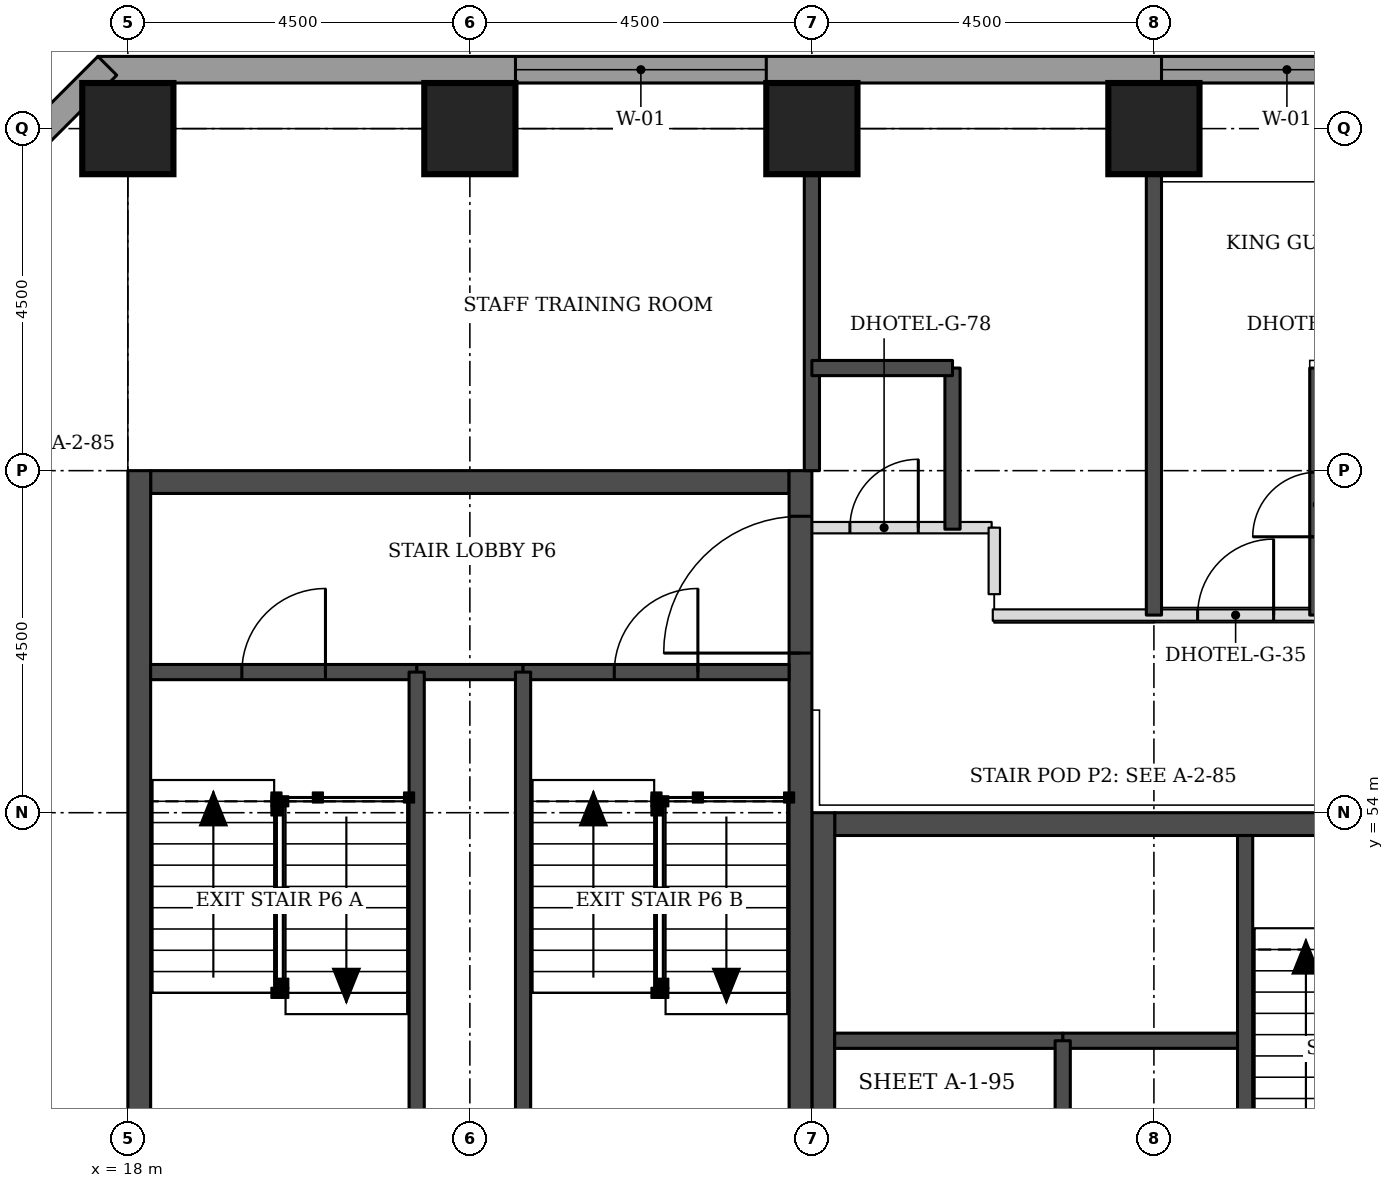
"""IFC4 building model, lengths in metres.
Left out: names, types, materials, properties, quantities, classifications, styles, units other than length and angle.
Written with IfcOpenShell. Run it as: python <this file> out.ifc"""

import sys

from ifc_helpers import new_model, si_unit, direction, frame, frame_2d, origin, origin_2d, place, context, subcontext, project, spatial, rectangle, extrude, element, fill, save


model = new_model("IFC4")
c1 = context("Model", 3, precision=1e-05, world=origin(), true_north=direction((0.0, 1.0)))
c2 = subcontext(c1, "Body", "Model", "MODEL_VIEW")
j1 = project(units=[si_unit("LENGTHUNIT", "METRE"), si_unit("PLANEANGLEUNIT", "RADIAN")], contexts=[c1])
p1 = place(None, origin())
s1 = spatial("IfcSite", under=j1, at=p1, CompositionType="ELEMENT")
p2 = place(p1, origin())
s2 = spatial("IfcBuilding", under=s1, at=p2, CompositionType="ELEMENT")
p3 = place(p2, frame((0.0, 0.0, 66.0)))
s3 = spatial("IfcBuildingStorey", under=s2, at=p3, CompositionType="ELEMENT", Elevation=66.0)
for number, where, z_axis, x_axis in (
    (1, (18.0, 63.0, 0.0), (0.0, 0.0, 1.0), (1.0, 0.0, 0.0)),
    (2, (22.5, 63.0, 0.0), (0.0, 0.0, 1.0), (1.0, 0.0, 0.0)),
    (3, (27.0, 63.0, 0.0), (0.0, 0.0, 1.0), (1.0, 0.0, 0.0)),
    (4, (31.5, 63.0, 0.0), (0.0, 0.0, 1.0), (1.0, 0.0, 0.0)),
):
    element("IfcColumn", number, at=place(p3, frame(where, z_axis=z_axis, x_axis=x_axis)), inside=s3, PredefinedType="COLUMN", context=c2, shape_type="SweptSolid", body=[
        extrude(rectangle(XDim=1.2, YDim=1.2, at=origin_2d()), origin(), (0.0, 0.0, 1.0), 3.3),
    ])
p4 = place(p3, frame((27.3, 53.85, 0.0), z_axis=(0.0, 0.0, 1.0), x_axis=(1.0, 0.0, 0.0)))
e5 = element("IfcWall", 5, at=p4, inside=s3, PredefinedType="SHEAR", context=c2, shape_type="SweptSolid", body=[
    extrude(rectangle(XDim=8.4, YDim=0.3, at=frame_2d((4.2, 0.0))), origin(), (0.0, 0.0, 1.0), 3.3),
])
p5 = place(p4, frame((6.4, 0.0, 0.0)))
e6 = element("IfcOpeningElement", 6, at=p5, cuts=e5, PredefinedType="OPENING", context=c2, shape_type="SweptSolid", body=[
    extrude(rectangle(XDim=1.1, YDim=2.1, at=frame_2d((0.55, 1.05))), frame((0.0, 0.16, 0.0), z_axis=(0.0, -1.0, 0.0), x_axis=(1.0, 0.0, 0.0)), (0.0, 0.0, 1.0), 0.32),
])
p6 = place(p3, frame((27.15, 45.0, 0.0), z_axis=(0.0, 0.0, 1.0), x_axis=(0.0, 1.0, 0.0)))
e7 = element("IfcWall", 7, at=p6, inside=s3, PredefinedType="SHEAR", context=c2, shape_type="SweptSolid", body=[
    extrude(rectangle(XDim=9.0, YDim=0.3, at=frame_2d((4.5, 0.0))), origin(), (0.0, 0.0, 1.0), 3.3),
])
p7 = place(p6, frame((0.4, 0.0, 0.0)))
e8 = element("IfcOpeningElement", 8, at=p7, cuts=e7, PredefinedType="OPENING", context=c2, shape_type="SweptSolid", body=[
    extrude(rectangle(XDim=1.1, YDim=2.1, at=frame_2d((0.55, 1.05))), frame((0.0, 0.16, 0.0), z_axis=(0.0, -1.0, 0.0), x_axis=(1.0, 0.0, 0.0)), (0.0, 0.0, 1.0), 0.32),
])
p8 = place(p3, frame((18.3, 58.35, 0.0), z_axis=(0.0, 0.0, 1.0), x_axis=(1.0, 0.0, 0.0)))
e9 = element("IfcWall", 9, at=p8, inside=s3, PredefinedType="SHEAR", context=c2, shape_type="SweptSolid", body=[
    extrude(rectangle(XDim=8.4, YDim=0.3, at=frame_2d((4.2, 0.0))), origin(), (0.0, 0.0, 1.0), 3.3),
])
p9 = place(p3, frame((18.15, 49.5, 0.0), z_axis=(0.0, 0.0, 1.0), x_axis=(0.0, 1.0, 0.0)))
e10 = element("IfcWall", 10, at=p9, inside=s3, PredefinedType="SHEAR", context=c2, shape_type="SweptSolid", body=[
    extrude(rectangle(XDim=9.0, YDim=0.3, at=frame_2d((4.5, 0.0))), origin(), (0.0, 0.0, 1.0), 3.3),
])
p10 = place(p3, frame((26.85, 49.5, 0.0), z_axis=(0.0, 0.0, 1.0), x_axis=(0.0, 1.0, 0.0)))
e11 = element("IfcWall", 11, at=p10, inside=s3, PredefinedType="SHEAR", context=c2, shape_type="SweptSolid", body=[
    extrude(rectangle(XDim=9.0, YDim=0.3, at=frame_2d((4.5, 0.0))), origin(), (0.0, 0.0, 1.0), 3.3),
])
p11 = place(p10, frame((6.6, 0.0, 0.0)))
e12 = element("IfcOpeningElement", 12, at=p11, cuts=e11, PredefinedType="OPENING", context=c2, shape_type="SweptSolid", body=[
    extrude(rectangle(XDim=1.8, YDim=2.1, at=frame_2d((0.9, 1.05))), frame((0.0, 0.16, 0.0), z_axis=(0.0, -1.0, 0.0), x_axis=(1.0, 0.0, 0.0)), (0.0, 0.0, 1.0), 0.32),
])
p12 = place(p3, frame((35.4, 63.775, 0.0), z_axis=(0.0, 0.0, 1.0), x_axis=(-1.0, 0.0, 0.0)))
e13 = element("IfcWall", 13, at=p12, inside=s3, PredefinedType="STANDARD", context=c2, shape_type="SweptSolid", body=[
    extrude(rectangle(XDim=17.793, YDim=0.35, at=frame_2d((8.897, 0.0))), origin(), (0.0, 0.0, 1.0), 3.055),
])
p13 = place(p12, frame((0.5, 0.0, 0.8)))
e14 = element("IfcOpeningElement", 14, at=p13, cuts=e13, PredefinedType="OPENING", context=c2, shape_type="SweptSolid", body=[
    extrude(rectangle(XDim=3.3, YDim=1.5, at=frame_2d((1.65, 0.75))), frame((0.0, 0.185, 0.0), z_axis=(0.0, -1.0, 0.0), x_axis=(1.0, 0.0, 0.0)), (0.0, 0.0, 1.0), 0.37),
])
p14 = place(p12, frame((9.0, 0.0, 0.8)))
e15 = element("IfcOpeningElement", 15, at=p14, cuts=e13, PredefinedType="OPENING", context=c2, shape_type="SweptSolid", body=[
    extrude(rectangle(XDim=3.3, YDim=1.5, at=frame_2d((1.65, 0.75))), frame((0.0, 0.185, 0.0), z_axis=(0.0, -1.0, 0.0), x_axis=(1.0, 0.0, 0.0)), (0.0, 0.0, 1.0), 0.37),
])
p15 = place(p3, frame((17.73, 63.826, 0.0), z_axis=(0.0, 0.0, 1.0), x_axis=(-0.707106781187, -0.707106781187, 0.0)))
e16 = element("IfcWall", 16, at=p15, inside=s3, PredefinedType="STANDARD", context=c2, shape_type="SweptSolid", body=[
    extrude(rectangle(XDim=7.151, YDim=0.35, at=frame_2d((3.576, 0.0))), origin(), (0.0, 0.0, 1.0), 3.055),
])
p16 = place(p15, frame((1.926, 0.0, 0.8)))
e17 = element("IfcOpeningElement", 17, at=p16, cuts=e16, PredefinedType="OPENING", context=c2, shape_type="SweptSolid", body=[
    extrude(rectangle(XDim=3.3, YDim=1.5, at=frame_2d((1.65, 0.75))), frame((0.0, 0.185, 0.0), z_axis=(0.0, -1.0, 0.0), x_axis=(1.0, 0.0, 0.0)), (0.0, 0.0, 1.0), 0.37),
])
p17 = place(p3, frame((29.38, 56.6, 0.0), z_axis=(0.0, 0.0, 1.0), x_axis=(1.0, 0.0, 0.0)))
e18 = element("IfcWall", 18, at=p17, inside=s3, PredefinedType="PARTITIONING", context=c2, shape_type="SweptSolid", body=[
    extrude(rectangle(XDim=13.62, YDim=0.15, at=frame_2d((6.81, 0.0))), origin(), (0.0, 0.0, 1.0), 3.08),
])
p18 = place(p17, frame((2.695, 0.0, 0.0)))
e19 = element("IfcOpeningElement", 19, at=p18, cuts=e18, PredefinedType="OPENING", context=c2, shape_type="SweptSolid", body=[
    extrude(rectangle(XDim=1.0, YDim=2.1, at=frame_2d((0.5, 1.05))), frame((0.0, 0.085, 0.0), z_axis=(0.0, -1.0, 0.0), x_axis=(1.0, 0.0, 0.0)), (0.0, 0.0, 1.0), 0.17),
])
p19 = place(p17, frame((9.67, 0.0, 0.0)))
e20 = element("IfcOpeningElement", 20, at=p19, cuts=e18, PredefinedType="OPENING", context=c2, shape_type="SweptSolid", body=[
    extrude(rectangle(XDim=0.9, YDim=2.1, at=frame_2d((0.45, 1.05))), frame((0.0, 0.085, 0.0), z_axis=(0.0, -1.0, 0.0), x_axis=(1.0, 0.0, 0.0)), (0.0, 0.0, 1.0), 0.17),
])
p20 = place(p3, frame((27.0, 58.5, 0.0), z_axis=(0.0, 0.0, 1.0), x_axis=(0.0, 1.0, 0.0)))
e21 = element("IfcWall", 21, at=p20, inside=s3, PredefinedType="SOLIDWALL", context=c2, shape_type="SweptSolid", body=[
    extrude(rectangle(XDim=3.9, YDim=0.2, at=frame_2d((1.95, 0.0))), origin(), (0.0, 0.0, 1.0), 3.08),
])
p21 = place(p3, frame((28.85, 57.73, 0.0), z_axis=(0.0, 0.0, 1.0), x_axis=(0.0, 1.0, 0.0)))
e22 = element("IfcWall", 22, at=p21, inside=s3, PredefinedType="SOLIDWALL", context=c2, shape_type="SweptSolid", body=[
    extrude(rectangle(XDim=2.12, YDim=0.2, at=frame_2d((1.06, 0.0))), origin(), (0.0, 0.0, 1.0), 3.08),
])
p22 = place(p3, frame((31.5, 56.6, 0.0), z_axis=(0.0, 0.0, 1.0), x_axis=(0.0, 1.0, 0.0)))
e23 = element("IfcWall", 23, at=p22, inside=s3, PredefinedType="SOLIDWALL", context=c2, shape_type="SweptSolid", body=[
    extrude(rectangle(XDim=5.8, YDim=0.2, at=frame_2d((2.9, 0.0))), origin(), (0.0, 0.0, 1.0), 3.08),
])
p23 = place(p3, frame((33.65, 56.6, 0.0), z_axis=(0.0, 0.0, 1.0), x_axis=(0.0, 1.0, 0.0)))
e24 = element("IfcWall", 24, at=p23, inside=s3, PredefinedType="SOLIDWALL", context=c2, shape_type="SweptSolid", body=[
    extrude(rectangle(XDim=3.25, YDim=0.2, at=frame_2d((1.625, 0.0))), origin(), (0.0, 0.0, 1.0), 3.08),
])
p24 = place(p23, frame((1.03, 0.0, 0.0)))
e25 = element("IfcOpeningElement", 25, at=p24, cuts=e24, PredefinedType="OPENING", context=c2, shape_type="SweptSolid", body=[
    extrude(rectangle(XDim=0.85, YDim=2.1, at=frame_2d((0.425, 1.05))), frame((0.0, 0.11, 0.0), z_axis=(0.0, -1.0, 0.0), x_axis=(1.0, 0.0, 0.0)), (0.0, 0.0, 1.0), 0.22),
])
p25 = place(p3, frame((27.0, 59.85, 0.0), z_axis=(0.0, 0.0, 1.0), x_axis=(1.0, 0.0, 0.0)))
e26 = element("IfcWall", 26, at=p25, inside=s3, PredefinedType="SOLIDWALL", context=c2, shape_type="SweptSolid", body=[
    extrude(rectangle(XDim=1.85, YDim=0.2, at=frame_2d((0.925, 0.0))), origin(), (0.0, 0.0, 1.0), 3.08),
])
p26 = place(p3, frame((27.0, 57.75, 0.0), z_axis=(0.0, 0.0, 1.0), x_axis=(1.0, 0.0, 0.0)))
e27 = element("IfcWall", 27, at=p26, inside=s3, PredefinedType="PARTITIONING", context=c2, shape_type="SweptSolid", body=[
    extrude(rectangle(XDim=2.365, YDim=0.15, at=frame_2d((1.183, 0.0))), origin(), (0.0, 0.0, 1.0), 3.08),
])
p27 = place(p26, frame((0.5, 0.0, 0.0)))
e28 = element("IfcOpeningElement", 28, at=p27, cuts=e27, PredefinedType="OPENING", context=c2, shape_type="SweptSolid", body=[
    extrude(rectangle(XDim=0.9, YDim=2.1, at=frame_2d((0.45, 1.05))), frame((0.0, 0.085, 0.0), z_axis=(0.0, -1.0, 0.0), x_axis=(1.0, 0.0, 0.0)), (0.0, 0.0, 1.0), 0.17),
])
p28 = place(p3, frame((29.4, 57.75, 0.0), z_axis=(0.0, 0.0, 1.0), x_axis=(0.0, -1.0, 0.0)))
e29 = element("IfcWall", 29, at=p28, inside=s3, PredefinedType="PARTITIONING", context=c2, shape_type="SweptSolid", body=[
    extrude(rectangle(XDim=0.875, YDim=0.15, at=frame_2d((0.438, 0.0))), origin(), (0.0, 0.0, 1.0), 3.08),
])
p29 = place(p3, frame((30.3, 51.0, 0.0), z_axis=(0.0, 0.0, 1.0), x_axis=(1.0, 0.0, 0.0)))
e30 = element("IfcWall", 30, at=p29, inside=s3, PredefinedType="SOLIDWALL", context=c2, shape_type="SweptSolid", body=[
    extrude(rectangle(XDim=2.4, YDim=0.2, at=frame_2d((1.2, 0.0))), origin(), (0.0, 0.0, 1.0), 3.3),
])
p30 = place(p3, frame((27.3, 51.0, 0.0), z_axis=(0.0, 0.0, 1.0), x_axis=(1.0, 0.0, 0.0)))
e31 = element("IfcWall", 31, at=p30, inside=s3, PredefinedType="SOLIDWALL", context=c2, shape_type="SweptSolid", body=[
    extrude(rectangle(XDim=3.0, YDim=0.2, at=frame_2d((1.5, 0.0))), origin(), (0.0, 0.0, 1.0), 3.08),
])
for number, where, z_axis, x_axis in (
    (32, (30.3, 45.3, 0.0), (0.0, 0.0, 1.0), (0.0, 1.0, 0.0)),
    (33, (32.7, 48.0, 0.0), (0.0, 0.0, 1.0), (0.0, 1.0, 0.0)),
):
    element("IfcWall", number, at=place(p3, frame(where, z_axis=z_axis, x_axis=x_axis)), inside=s3, PredefinedType="SOLIDWALL", context=c2, shape_type="SweptSolid", body=[
        extrude(rectangle(XDim=5.7, YDim=0.2, at=frame_2d((2.85, 0.0))), origin(), (0.0, 0.0, 1.0), 3.08),
    ])
p31 = place(p3, frame((21.8, 55.85, 0.0), z_axis=(0.0, 0.0, 1.0), x_axis=(1.0, 0.0, 0.0)))
e34 = element("IfcWall", 34, at=p31, inside=s3, PredefinedType="SOLIDWALL", context=c2, shape_type="SweptSolid", body=[
    extrude(rectangle(XDim=1.4, YDim=0.2, at=frame_2d((0.7, 0.0))), origin(), (0.0, 0.0, 1.0), 3.08),
])
p32 = place(p3, frame((18.3, 55.85, 0.0), z_axis=(0.0, 0.0, 1.0), x_axis=(1.0, 0.0, 0.0)))
e35 = element("IfcWall", 35, at=p32, inside=s3, PredefinedType="SOLIDWALL", context=c2, shape_type="SweptSolid", body=[
    extrude(rectangle(XDim=3.5, YDim=0.2, at=frame_2d((1.75, 0.0))), origin(), (0.0, 0.0, 1.0), 3.08),
])
p33 = place(p32, frame((1.2, 0.0, 0.0)))
e36 = element("IfcOpeningElement", 36, at=p33, cuts=e35, PredefinedType="OPENING", context=c2, shape_type="SweptSolid", body=[
    extrude(rectangle(XDim=1.1, YDim=2.1, at=frame_2d((0.55, 1.05))), frame((0.0, 0.11, 0.0), z_axis=(0.0, -1.0, 0.0), x_axis=(1.0, 0.0, 0.0)), (0.0, 0.0, 1.0), 0.22),
])
p34 = place(p3, frame((23.2, 55.85, 0.0), z_axis=(0.0, 0.0, 1.0), x_axis=(1.0, 0.0, 0.0)))
e37 = element("IfcWall", 37, at=p34, inside=s3, PredefinedType="SOLIDWALL", context=c2, shape_type="SweptSolid", body=[
    extrude(rectangle(XDim=3.5, YDim=0.2, at=frame_2d((1.75, 0.0))), origin(), (0.0, 0.0, 1.0), 3.08),
])
p35 = place(p34, frame((1.2, 0.0, 0.0)))
e38 = element("IfcOpeningElement", 38, at=p35, cuts=e37, PredefinedType="OPENING", context=c2, shape_type="SweptSolid", body=[
    extrude(rectangle(XDim=1.1, YDim=2.1, at=frame_2d((0.55, 1.05))), frame((0.0, 0.11, 0.0), z_axis=(0.0, -1.0, 0.0), x_axis=(1.0, 0.0, 0.0)), (0.0, 0.0, 1.0), 0.22),
])
for number, where, z_axis, x_axis in (
    (39, (21.8, 49.8, 0.0), (0.0, 0.0, 1.0), (0.0, 1.0, 0.0)),
    (40, (23.2, 49.8, 0.0), (0.0, 0.0, 1.0), (0.0, 1.0, 0.0)),
):
    element("IfcWall", number, at=place(p3, frame(where, z_axis=z_axis, x_axis=x_axis)), inside=s3, PredefinedType="SOLIDWALL", context=c2, shape_type="SweptSolid", body=[
        extrude(rectangle(XDim=6.05, YDim=0.2, at=frame_2d((3.025, 0.0))), origin(), (0.0, 0.0, 1.0), 3.08),
    ])
p36 = place(p13, origin())
e41 = element("IfcWindow", 41, at=p36, inside=s3, PartitioningType="SINGLE_PANEL", PredefinedType="WINDOW", context=c2, shape_type="SweptSolid", body=[
    extrude(rectangle(XDim=3.3, YDim=1.5, at=frame_2d((1.65, 0.75))), frame((0.0, 0.085, 0.0), z_axis=(0.0, -1.0, 0.0), x_axis=(1.0, 0.0, 0.0)), (0.0, 0.0, 1.0), 0.06),
])
fill(e14, e41)
p37 = place(p14, origin())
e42 = element("IfcWindow", 42, at=p37, inside=s3, PartitioningType="SINGLE_PANEL", PredefinedType="WINDOW", context=c2, shape_type="SweptSolid", body=[
    extrude(rectangle(XDim=3.3, YDim=1.5, at=frame_2d((1.65, 0.75))), frame((0.0, 0.085, 0.0), z_axis=(0.0, -1.0, 0.0), x_axis=(1.0, 0.0, 0.0)), (0.0, 0.0, 1.0), 0.06),
])
fill(e15, e42)
p38 = place(p18, origin())
e43 = element("IfcDoor", 43, at=p38, inside=s3, OperationType="SINGLE_SWING_RIGHT", PredefinedType="DOOR", context=c2, shape_type="SweptSolid", body=[
    extrude(rectangle(XDim=1.0, YDim=2.1, at=frame_2d((0.5, 1.05))), frame((0.0, 0.025, 0.0), z_axis=(0.0, -1.0, 0.0), x_axis=(1.0, 0.0, 0.0)), (0.0, 0.0, 1.0), 0.05),
])
fill(e19, e43)
p39 = place(p27, origin())
e44 = element("IfcDoor", 44, at=p39, inside=s3, OperationType="SINGLE_SWING_RIGHT", PredefinedType="DOOR", context=c2, shape_type="SweptSolid", body=[
    extrude(rectangle(XDim=0.9, YDim=2.1, at=frame_2d((0.45, 1.05))), frame((0.0, 0.025, 0.0), z_axis=(0.0, -1.0, 0.0), x_axis=(1.0, 0.0, 0.0)), (0.0, 0.0, 1.0), 0.05),
])
fill(e28, e44)
p40 = place(p33, origin())
e45 = element("IfcDoor", 45, at=p40, inside=s3, OperationType="SINGLE_SWING_RIGHT", PredefinedType="DOOR", context=c2, shape_type="SweptSolid", body=[
    extrude(rectangle(XDim=1.1, YDim=2.1, at=frame_2d((0.55, 1.05))), frame((0.0, 0.025, 0.0), z_axis=(0.0, -1.0, 0.0), x_axis=(1.0, 0.0, 0.0)), (0.0, 0.0, 1.0), 0.05),
])
fill(e36, e45)
p41 = place(p35, origin())
e46 = element("IfcDoor", 46, at=p41, inside=s3, OperationType="SINGLE_SWING_RIGHT", PredefinedType="DOOR", context=c2, shape_type="SweptSolid", body=[
    extrude(rectangle(XDim=1.1, YDim=2.1, at=frame_2d((0.55, 1.05))), frame((0.0, 0.025, 0.0), z_axis=(0.0, -1.0, 0.0), x_axis=(1.0, 0.0, 0.0)), (0.0, 0.0, 1.0), 0.05),
])
fill(e38, e46)
p42 = place(p11, origin())
e47 = element("IfcDoor", 47, at=p42, inside=s3, OperationType="SINGLE_SWING_LEFT", PredefinedType="DOOR", context=c2, shape_type="SweptSolid", body=[
    extrude(rectangle(XDim=1.8, YDim=2.1, at=frame_2d((0.9, 1.05))), frame((0.0, 0.025, 0.0), z_axis=(0.0, -1.0, 0.0), x_axis=(1.0, 0.0, 0.0)), (0.0, 0.0, 1.0), 0.05),
])
fill(e12, e47)
save(model, sys.argv[1])
